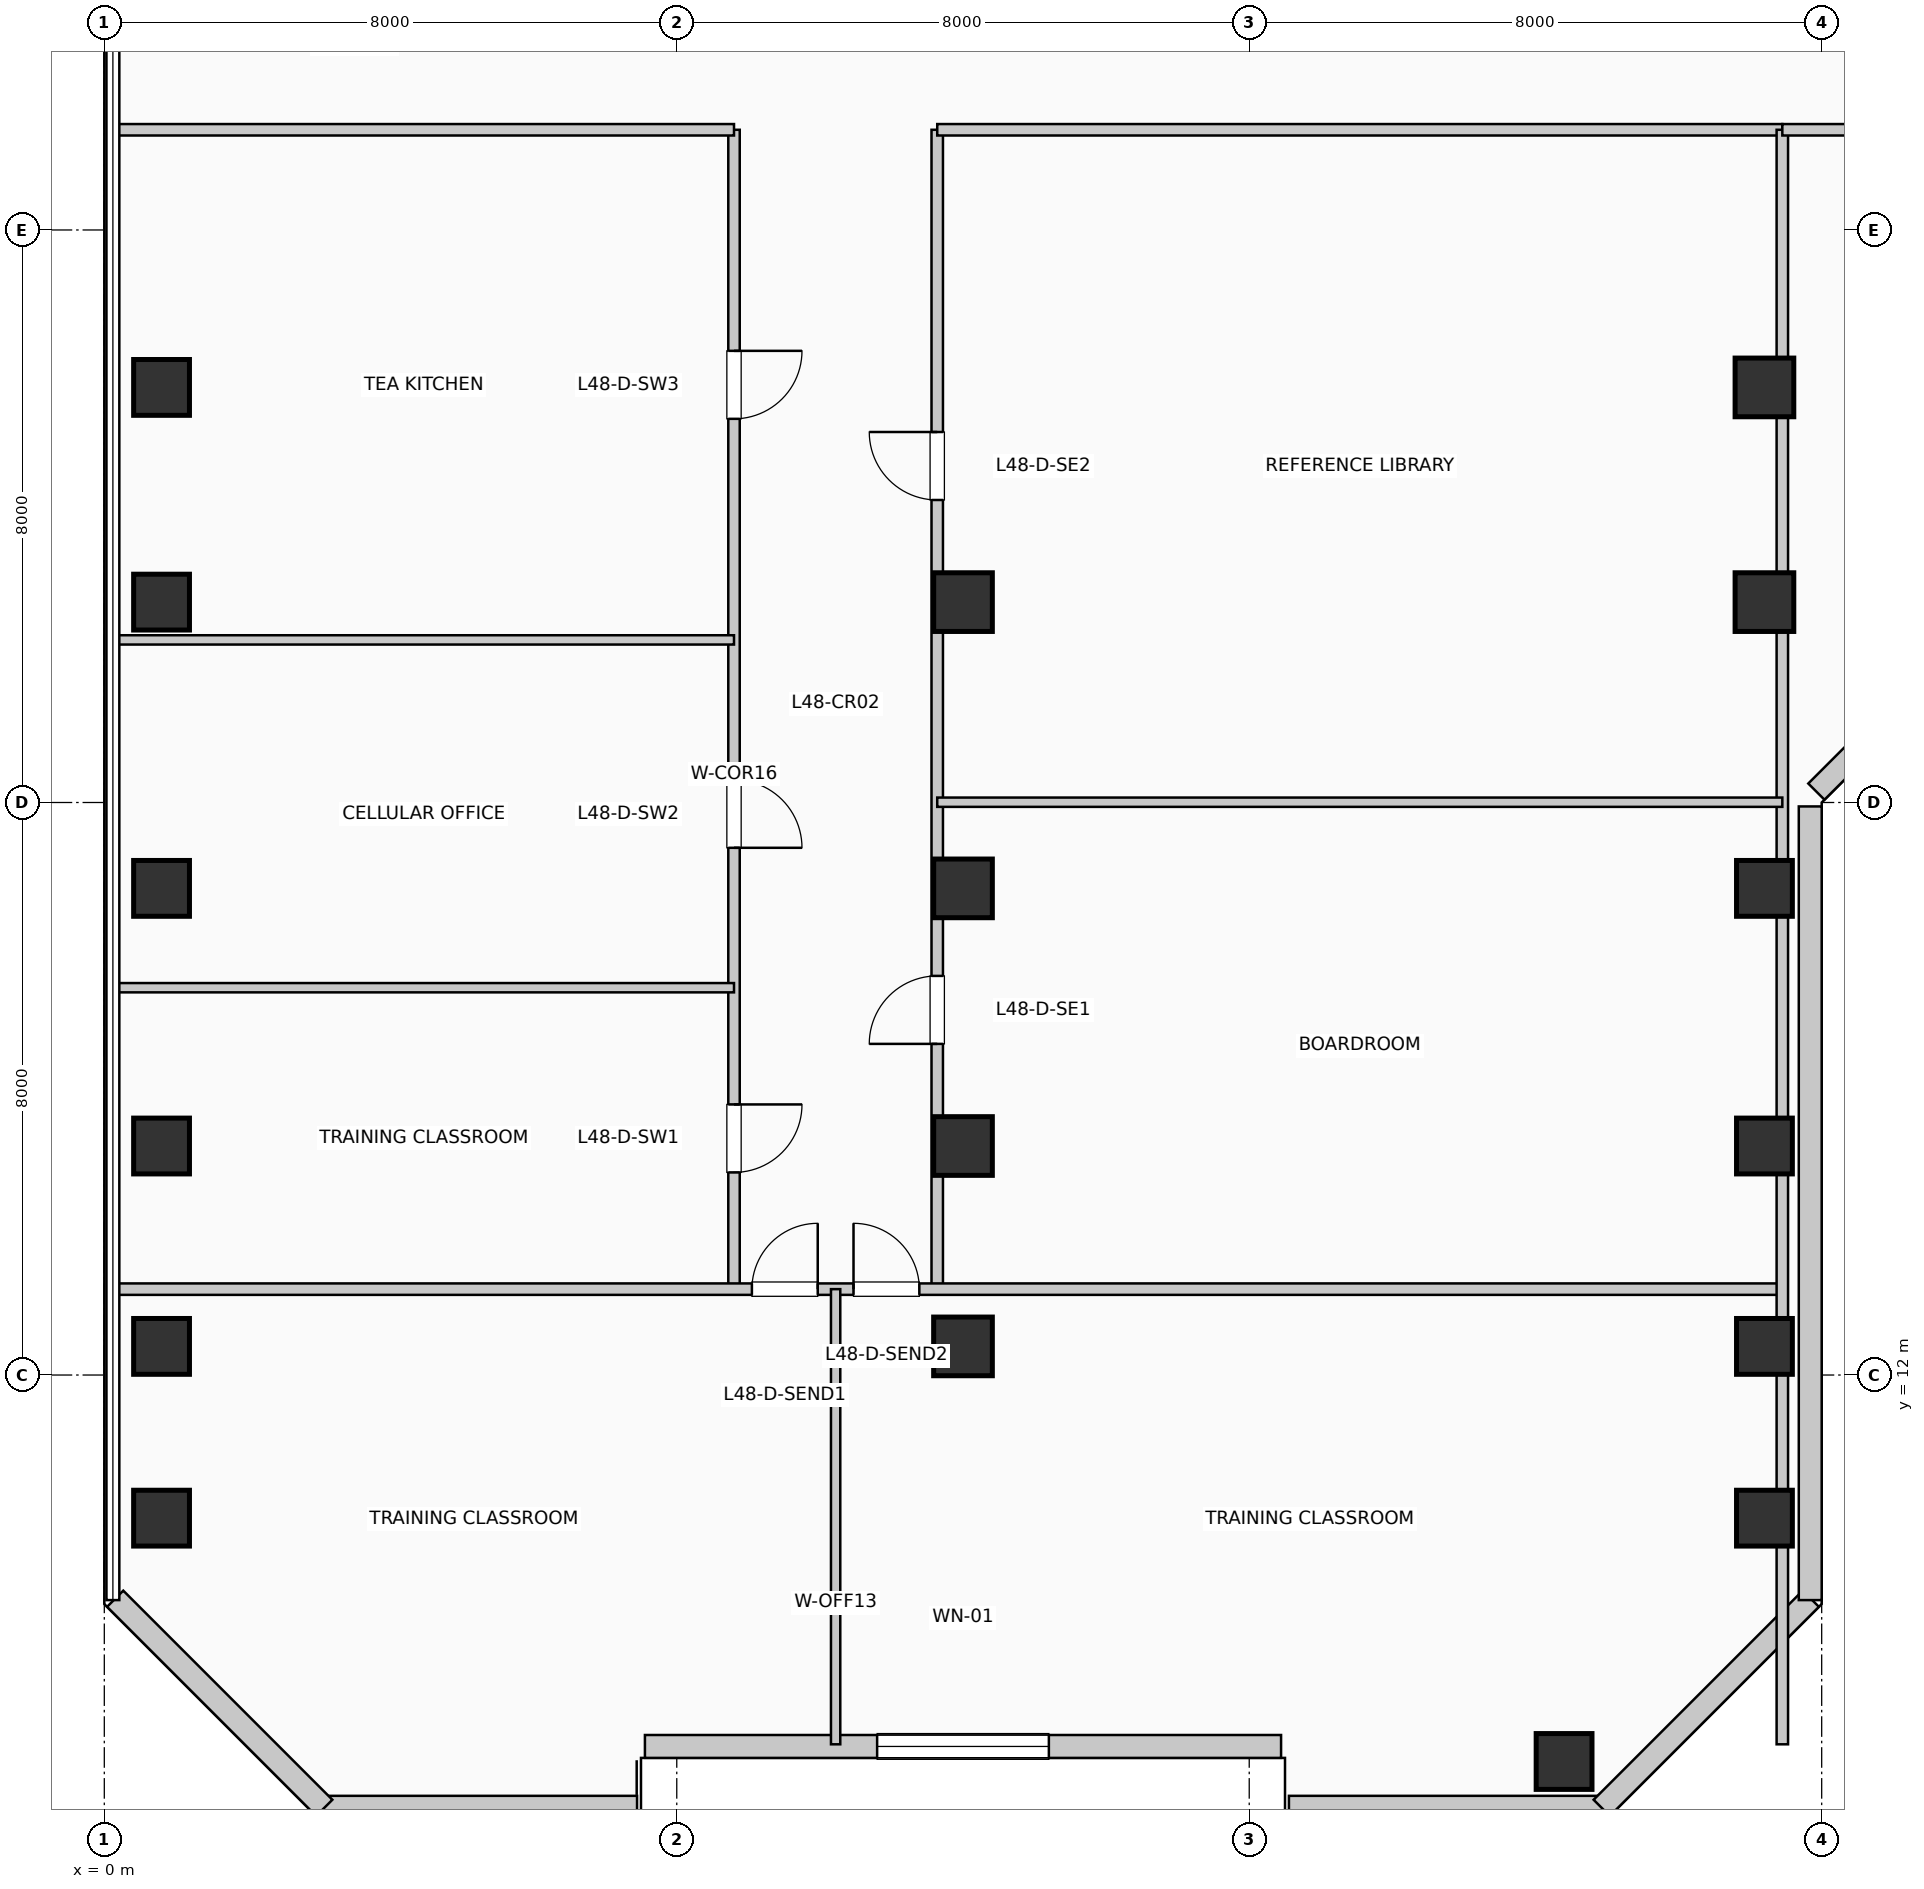
"""IFC4 building model, lengths in metres.
Left out: names, types, materials, properties, quantities, classifications, styles, units other than length and angle.
Written with IfcOpenShell. Run it as: python <this file> out.ifc"""

import sys

from ifc_helpers import new_model, si_unit, direction, frame, frame_2d, origin, origin_2d, place, context, subcontext, project, spatial, rectangle, extrude, element, fill, save


model = new_model("IFC4")
c1 = context("Model", 3, precision=1e-05, world=origin(), true_north=direction((0.0, 1.0)))
c2 = subcontext(c1, "Body", "Model", "MODEL_VIEW")
j1 = project(units=[si_unit("LENGTHUNIT", "METRE"), si_unit("PLANEANGLEUNIT", "RADIAN")], contexts=[c1])
p1 = place(None, origin())
s1 = spatial("IfcSite", under=j1, at=p1, CompositionType="ELEMENT")
p2 = place(p1, origin())
s2 = spatial("IfcBuilding", under=s1, at=p2, CompositionType="ELEMENT")
p3 = place(p2, frame((0.0, 0.0, 199.32)))
s3 = spatial("IfcBuildingStorey", under=s2, at=p3, CompositionType="ELEMENT", Elevation=199.32)
for number, where, z_axis, x_axis in (
    (1, (0.8, 10.0, 0.0), (0.0, 0.0, 1.0), (1.0, 0.0, 0.0)),
    (2, (0.8, 12.4, 0.0), (0.0, 0.0, 1.0), (1.0, 0.0, 0.0)),
    (3, (0.8, 15.2, 0.0), (0.0, 0.0, 1.0), (1.0, 0.0, 0.0)),
    (4, (0.8, 18.8, 0.0), (0.0, 0.0, 1.0), (1.0, 0.0, 0.0)),
    (5, (0.8, 22.8, 0.0), (0.0, 0.0, 1.0), (1.0, 0.0, 0.0)),
    (6, (0.8, 25.8, 0.0), (0.0, 0.0, 1.0), (1.0, 0.0, 0.0)),
):
    element("IfcColumn", number, at=place(p3, frame(where, z_axis=z_axis, x_axis=x_axis)), inside=s3, PredefinedType="COLUMN", context=c2, shape_type="SweptSolid", body=[
        extrude(rectangle(XDim=0.78, YDim=0.78, at=origin_2d()), origin(), (0.0, 0.0, 1.0), 3.96),
    ])
for number, where, z_axis, x_axis in (
    (7, (12.0, 12.4, 0.0), (0.0, 0.0, 1.0), (1.0, 0.0, 0.0)),
    (8, (12.0, 15.2, 0.0), (0.0, 0.0, 1.0), (1.0, 0.0, 0.0)),
    (9, (12.0, 18.8, 0.0), (0.0, 0.0, 1.0), (1.0, 0.0, 0.0)),
    (10, (12.0, 22.8, 0.0), (0.0, 0.0, 1.0), (1.0, 0.0, 0.0)),
):
    element("IfcColumn", number, at=place(p3, frame(where, z_axis=z_axis, x_axis=x_axis)), inside=s3, PredefinedType="COLUMN", context=c2, shape_type="SweptSolid", body=[
        extrude(rectangle(XDim=0.82, YDim=0.82, at=origin_2d()), origin(), (0.0, 0.0, 1.0), 3.96),
    ])
for number, where, z_axis, x_axis in (
    (11, (20.4, 6.6, 0.0), (0.0, 0.0, 1.0), (1.0, 0.0, 0.0)),
    (12, (23.2, 10.0, 0.0), (0.0, 0.0, 1.0), (1.0, 0.0, 0.0)),
    (13, (23.2, 12.4, 0.0), (0.0, 0.0, 1.0), (1.0, 0.0, 0.0)),
    (14, (23.2, 15.2, 0.0), (0.0, 0.0, 1.0), (1.0, 0.0, 0.0)),
    (15, (23.2, 18.8, 0.0), (0.0, 0.0, 1.0), (1.0, 0.0, 0.0)),
):
    element("IfcColumn", number, at=place(p3, frame(where, z_axis=z_axis, x_axis=x_axis)), inside=s3, PredefinedType="COLUMN", context=c2, shape_type="SweptSolid", body=[
        extrude(rectangle(XDim=0.78, YDim=0.78, at=origin_2d()), origin(), (0.0, 0.0, 1.0), 3.96),
    ])
for number, where, z_axis, x_axis in (
    (16, (23.2, 22.8, 0.0), (0.0, 0.0, 1.0), (1.0, 0.0, 0.0)),
    (17, (23.2, 25.8, 0.0), (0.0, 0.0, 1.0), (1.0, 0.0, 0.0)),
):
    element("IfcColumn", number, at=place(p3, frame(where, z_axis=z_axis, x_axis=x_axis)), inside=s3, PredefinedType="COLUMN", context=c2, shape_type="SweptSolid", body=[
        extrude(rectangle(XDim=0.82, YDim=0.82, at=origin_2d()), origin(), (0.0, 0.0, 1.0), 3.96),
    ])
p4 = place(p3, frame((3.055, 5.96, 0.0), z_axis=(0.0, 0.0, 1.0), x_axis=(1.0, 0.0, 0.0)))
e18 = element("IfcWall", 18, at=p4, inside=s3, PredefinedType="SOLIDWALL", context=c2, shape_type="SweptSolid", body=[
    extrude(rectangle(XDim=4.39, YDim=0.32, at=frame_2d((2.195, 0.0))), origin(), (0.0, 0.0, 1.0), 3.71),
])
p5 = place(p3, frame((7.555, 6.81, 0.0), z_axis=(0.0, 0.0, 1.0), x_axis=(1.0, 0.0, 0.0)))
e19 = element("IfcWall", 19, at=p5, inside=s3, PredefinedType="SOLIDWALL", context=c2, shape_type="SweptSolid", body=[
    extrude(rectangle(XDim=8.89, YDim=0.32, at=frame_2d((4.445, 0.0))), origin(), (0.0, 0.0, 1.0), 3.71),
])
p6 = place(p5, frame((3.245, 0.0, 0.85)))
e20 = element("IfcOpeningElement", 20, at=p6, cuts=e19, PredefinedType="OPENING", context=c2, shape_type="SweptSolid", body=[
    extrude(rectangle(XDim=2.4, YDim=2.05, at=frame_2d((1.2, 1.025))), frame((0.0, 0.17, 0.0), z_axis=(0.0, -1.0, 0.0), x_axis=(1.0, 0.0, 0.0)), (0.0, 0.0, 1.0), 0.34),
])
p7 = place(p3, frame((16.555, 5.96, 0.0), z_axis=(0.0, 0.0, 1.0), x_axis=(1.0, 0.0, 0.0)))
e21 = element("IfcWall", 21, at=p7, inside=s3, PredefinedType="SOLIDWALL", context=c2, shape_type="SweptSolid", body=[
    extrude(rectangle(XDim=4.39, YDim=0.32, at=frame_2d((2.195, 0.0))), origin(), (0.0, 0.0, 1.0), 3.71),
])
p8 = place(p3, frame((20.926, 5.952, 0.0), z_axis=(0.0, 0.0, 1.0), x_axis=(0.707077242712, 0.707136318428, 0.0)))
e22 = element("IfcWall", 22, at=p8, inside=s3, PredefinedType="SOLIDWALL", context=c2, shape_type="SweptSolid", body=[
    extrude(rectangle(XDim=4.133, YDim=0.32, at=frame_2d((2.066, 0.0))), origin(), (0.0, 0.0, 1.0), 3.71),
])
p9 = place(p3, frame((23.84, 8.855, 0.0), z_axis=(0.0, 0.0, 1.0), x_axis=(0.0, 1.0, 0.0)))
e23 = element("IfcWall", 23, at=p9, inside=s3, PredefinedType="SOLIDWALL", context=c2, shape_type="SweptSolid", body=[
    extrude(rectangle(XDim=11.09, YDim=0.32, at=frame_2d((5.545, 0.0))), origin(), (0.0, 0.0, 1.0), 3.71),
])
p10 = place(p3, frame((23.926, 20.152, 0.0), z_axis=(0.0, 0.0, 1.0), x_axis=(0.707106781187, 0.707106781187, 0.0)))
e24 = element("IfcWall", 24, at=p10, inside=s3, PredefinedType="SOLIDWALL", context=c2, shape_type="SweptSolid", body=[
    extrude(rectangle(XDim=2.718, YDim=0.32, at=frame_2d((1.359, 0.0))), origin(), (0.0, 0.0, 1.0), 3.71),
])
p11 = place(p3, frame((0.152, 8.874, 0.0), z_axis=(0.0, 0.0, 1.0), x_axis=(0.707077242712, -0.707136318428, 0.0)))
e25 = element("IfcWall", 25, at=p11, inside=s3, PredefinedType="SOLIDWALL", context=c2, shape_type="SweptSolid", body=[
    extrude(rectangle(XDim=4.133, YDim=0.32, at=frame_2d((2.066, 0.0))), origin(), (0.0, 0.0, 1.0), 3.71),
])
p12 = place(p3, frame((8.8, 13.2, 0.0), z_axis=(0.0, 0.0, 1.0), x_axis=(0.0, 1.0, 0.0)))
e26 = element("IfcWall", 26, at=p12, inside=s3, PredefinedType="PARTITIONING", context=c2, shape_type="SweptSolid", body=[
    extrude(rectangle(XDim=16.2, YDim=0.16, at=frame_2d((8.1, 0.0))), origin(), (0.0, 0.0, 1.0), 3.71),
])
p13 = place(p12, frame((2.581, 0.0, 0.0), z_axis=(0.0, 0.0, 1.0), x_axis=(-1.0, 0.0, 0.0)))
e27 = element("IfcOpeningElement", 27, at=p13, cuts=e26, PredefinedType="OPENING", context=c2, shape_type="SweptSolid", body=[
    extrude(rectangle(XDim=0.95, YDim=2.15, at=frame_2d((0.475, 1.075))), frame((0.0, 0.09, 0.0), z_axis=(0.0, -1.0, 0.0), x_axis=(1.0, 0.0, 0.0)), (0.0, 0.0, 1.0), 0.18),
])
p14 = place(p12, frame((7.117, 0.0, 0.0), z_axis=(0.0, 0.0, 1.0), x_axis=(-1.0, 0.0, 0.0)))
e28 = element("IfcOpeningElement", 28, at=p14, cuts=e26, PredefinedType="OPENING", context=c2, shape_type="SweptSolid", body=[
    extrude(rectangle(XDim=0.95, YDim=2.15, at=frame_2d((0.475, 1.075))), frame((0.0, 0.09, 0.0), z_axis=(0.0, -1.0, 0.0), x_axis=(1.0, 0.0, 0.0)), (0.0, 0.0, 1.0), 0.18),
])
p15 = place(p12, frame((13.111, 0.0, 0.0), z_axis=(0.0, 0.0, 1.0), x_axis=(-1.0, 0.0, 0.0)))
e29 = element("IfcOpeningElement", 29, at=p15, cuts=e26, PredefinedType="OPENING", context=c2, shape_type="SweptSolid", body=[
    extrude(rectangle(XDim=0.95, YDim=2.15, at=frame_2d((0.475, 1.075))), frame((0.0, 0.09, 0.0), z_axis=(0.0, -1.0, 0.0), x_axis=(1.0, 0.0, 0.0)), (0.0, 0.0, 1.0), 0.18),
])
p16 = place(p3, frame((11.64, 13.2, 0.0), z_axis=(0.0, 0.0, 1.0), x_axis=(0.0, 1.0, 0.0)))
e30 = element("IfcWall", 30, at=p16, inside=s3, PredefinedType="PARTITIONING", context=c2, shape_type="SweptSolid", body=[
    extrude(rectangle(XDim=16.2, YDim=0.16, at=frame_2d((8.1, 0.0))), origin(), (0.0, 0.0, 1.0), 3.095),
])
p17 = place(p16, frame((3.427, 0.0, 0.0)))
e31 = element("IfcOpeningElement", 31, at=p17, cuts=e30, PredefinedType="OPENING", context=c2, shape_type="SweptSolid", body=[
    extrude(rectangle(XDim=0.95, YDim=2.15, at=frame_2d((0.475, 1.075))), frame((0.0, 0.09, 0.0), z_axis=(0.0, -1.0, 0.0), x_axis=(1.0, 0.0, 0.0)), (0.0, 0.0, 1.0), 0.18),
])
p18 = place(p16, frame((11.027, 0.0, 0.0)))
e32 = element("IfcOpeningElement", 32, at=p18, cuts=e30, PredefinedType="OPENING", context=c2, shape_type="SweptSolid", body=[
    extrude(rectangle(XDim=0.95, YDim=2.15, at=frame_2d((0.475, 1.075))), frame((0.0, 0.09, 0.0), z_axis=(0.0, -1.0, 0.0), x_axis=(1.0, 0.0, 0.0)), (0.0, 0.0, 1.0), 0.18),
])
p19 = place(p3, frame((0.19, 13.2, 0.0), z_axis=(0.0, 0.0, 1.0), x_axis=(1.0, 0.0, 0.0)))
e33 = element("IfcWall", 33, at=p19, inside=s3, PredefinedType="PARTITIONING", context=c2, shape_type="SweptSolid", body=[
    extrude(rectangle(XDim=23.26, YDim=0.16, at=frame_2d((11.63, 0.0))), origin(), (0.0, 0.0, 1.0), 3.71),
])
p20 = place(p19, frame((8.86, 0.0, 0.0)))
e34 = element("IfcOpeningElement", 34, at=p20, cuts=e33, PredefinedType="OPENING", context=c2, shape_type="SweptSolid", body=[
    extrude(rectangle(XDim=0.92, YDim=2.1, at=frame_2d((0.46, 1.05))), frame((0.0, 0.09, 0.0), z_axis=(0.0, -1.0, 0.0), x_axis=(1.0, 0.0, 0.0)), (0.0, 0.0, 1.0), 0.18),
])
p21 = place(p19, frame((10.28, 0.0, 0.0)))
e35 = element("IfcOpeningElement", 35, at=p21, cuts=e33, PredefinedType="OPENING", context=c2, shape_type="SweptSolid", body=[
    extrude(rectangle(XDim=0.92, YDim=2.1, at=frame_2d((0.46, 1.05))), frame((0.0, 0.09, 0.0), z_axis=(0.0, -1.0, 0.0), x_axis=(1.0, 0.0, 0.0)), (0.0, 0.0, 1.0), 0.18),
])
p22 = place(p3, frame((0.19, 29.4, 0.0), z_axis=(0.0, 0.0, 1.0), x_axis=(1.0, 0.0, 0.0)))
e36 = element("IfcWall", 36, at=p22, inside=s3, PredefinedType="PARTITIONING", context=c2, shape_type="SweptSolid", body=[
    extrude(rectangle(XDim=8.61, YDim=0.16, at=frame_2d((4.305, 0.0))), origin(), (0.0, 0.0, 1.0), 3.365),
])
p23 = place(p3, frame((11.64, 29.4, 0.0), z_axis=(0.0, 0.0, 1.0), x_axis=(1.0, 0.0, 0.0)))
e37 = element("IfcWall", 37, at=p23, inside=s3, PredefinedType="PARTITIONING", context=c2, shape_type="SweptSolid", body=[
    extrude(rectangle(XDim=11.81, YDim=0.16, at=frame_2d((5.905, 0.0))), origin(), (0.0, 0.0, 1.0), 3.365),
])
p24 = place(p3, frame((23.45, 6.84, 0.0), z_axis=(0.0, 0.0, 1.0), x_axis=(0.0, 1.0, 0.0)))
e38 = element("IfcWall", 38, at=p24, inside=s3, PredefinedType="PARTITIONING", context=c2, shape_type="SweptSolid", body=[
    extrude(rectangle(XDim=22.56, YDim=0.16, at=frame_2d((11.28, 0.0))), origin(), (0.0, 0.0, 1.0), 3.095),
])
p25 = place(p3, frame((10.22, 6.84, 0.0), z_axis=(0.0, 0.0, 1.0), x_axis=(0.0, 1.0, 0.0)))
e39 = element("IfcWall", 39, at=p25, inside=s3, PredefinedType="PARTITIONING", context=c2, shape_type="SweptSolid", body=[
    extrude(rectangle(XDim=6.36, YDim=0.13, at=frame_2d((3.18, 0.0))), origin(), (0.0, 0.0, 1.0), 3.71),
])
for number, where, z_axis, x_axis in (
    (40, (0.19, 17.412, 0.0), (0.0, 0.0, 1.0), (1.0, 0.0, 0.0)),
    (41, (0.19, 22.272, 0.0), (0.0, 0.0, 1.0), (1.0, 0.0, 0.0)),
):
    element("IfcWall", number, at=place(p3, frame(where, z_axis=z_axis, x_axis=x_axis)), inside=s3, PredefinedType="PARTITIONING", context=c2, shape_type="SweptSolid", body=[
        extrude(rectangle(XDim=8.61, YDim=0.13, at=frame_2d((4.305, 0.0))), origin(), (0.0, 0.0, 1.0), 3.71),
    ])
p26 = place(p3, frame((11.64, 20.004, 0.0), z_axis=(0.0, 0.0, 1.0), x_axis=(1.0, 0.0, 0.0)))
e42 = element("IfcWall", 42, at=p26, inside=s3, PredefinedType="PARTITIONING", context=c2, shape_type="SweptSolid", body=[
    extrude(rectangle(XDim=11.81, YDim=0.13, at=frame_2d((5.905, 0.0))), origin(), (0.0, 0.0, 1.0), 3.71),
])
p27 = place(p3, frame((23.45, 29.4, 0.0), z_axis=(0.0, 0.0, 1.0), x_axis=(1.0, 0.0, 0.0)))
e43 = element("IfcWall", 43, at=p27, inside=s3, PredefinedType="PARTITIONING", context=c2, shape_type="SweptSolid", body=[
    extrude(rectangle(XDim=26.56, YDim=0.16, at=frame_2d((13.28, 0.0))), origin(), (0.0, 0.0, 1.0), 3.365),
])
p28 = place(p27, frame((5.787, 0.0, 0.0), z_axis=(0.0, 0.0, 1.0), x_axis=(-1.0, 0.0, 0.0)))
e44 = element("IfcOpeningElement", 44, at=p28, cuts=e43, PredefinedType="OPENING", context=c2, shape_type="SweptSolid", body=[
    extrude(rectangle(XDim=0.95, YDim=2.15, at=frame_2d((0.475, 1.075))), frame((0.0, 0.09, 0.0), z_axis=(0.0, -1.0, 0.0), x_axis=(1.0, 0.0, 0.0)), (0.0, 0.0, 1.0), 0.18),
])
p29 = place(p27, frame((19.067, 0.0, 0.0), z_axis=(0.0, 0.0, 1.0), x_axis=(-1.0, 0.0, 0.0)))
e45 = element("IfcOpeningElement", 45, at=p29, cuts=e43, PredefinedType="OPENING", context=c2, shape_type="SweptSolid", body=[
    extrude(rectangle(XDim=0.95, YDim=2.15, at=frame_2d((0.475, 1.075))), frame((0.0, 0.09, 0.0), z_axis=(0.0, -1.0, 0.0), x_axis=(1.0, 0.0, 0.0)), (0.0, 0.0, 1.0), 0.18),
])
p30 = place(p6, origin())
e46 = element("IfcWindow", 46, at=p30, inside=s3, PartitioningType="SINGLE_PANEL", PredefinedType="WINDOW", context=c2, shape_type="SweptSolid", body=[
    extrude(rectangle(XDim=2.4, YDim=2.05, at=frame_2d((1.2, 1.025))), frame((0.0, 0.03, 0.0), z_axis=(0.0, -1.0, 0.0), x_axis=(1.0, 0.0, 0.0)), (0.0, 0.0, 1.0), 0.06),
])
fill(e20, e46)
p31 = place(p20, origin())
e47 = element("IfcDoor", 47, at=p31, inside=s3, OperationType="SINGLE_SWING_RIGHT", PredefinedType="DOOR", context=c2, shape_type="SweptSolid", body=[
    extrude(rectangle(XDim=0.92, YDim=2.1, at=frame_2d((0.46, 1.05))), frame((0.0, 0.025, 0.0), z_axis=(0.0, -1.0, 0.0), x_axis=(1.0, 0.0, 0.0)), (0.0, 0.0, 1.0), 0.05),
])
fill(e34, e47)
p32 = place(p21, origin())
e48 = element("IfcDoor", 48, at=p32, inside=s3, OperationType="SINGLE_SWING_LEFT", PredefinedType="DOOR", context=c2, shape_type="SweptSolid", body=[
    extrude(rectangle(XDim=0.92, YDim=2.1, at=frame_2d((0.46, 1.05))), frame((0.0, 0.025, 0.0), z_axis=(0.0, -1.0, 0.0), x_axis=(1.0, 0.0, 0.0)), (0.0, 0.0, 1.0), 0.05),
])
fill(e35, e48)
p33 = place(p13, origin())
e49 = element("IfcDoor", 49, at=p33, inside=s3, OperationType="SINGLE_SWING_RIGHT", PredefinedType="DOOR", context=c2, shape_type="SweptSolid", body=[
    extrude(rectangle(XDim=0.95, YDim=2.15, at=frame_2d((0.475, 1.075))), frame((0.0, 0.025, 0.0), z_axis=(0.0, -1.0, 0.0), x_axis=(1.0, 0.0, 0.0)), (0.0, 0.0, 1.0), 0.05),
])
fill(e27, e49)
p34 = place(p14, origin())
e50 = element("IfcDoor", 50, at=p34, inside=s3, OperationType="SINGLE_SWING_LEFT", PredefinedType="DOOR", context=c2, shape_type="SweptSolid", body=[
    extrude(rectangle(XDim=0.95, YDim=2.15, at=frame_2d((0.475, 1.075))), frame((0.0, 0.025, 0.0), z_axis=(0.0, -1.0, 0.0), x_axis=(1.0, 0.0, 0.0)), (0.0, 0.0, 1.0), 0.05),
])
fill(e28, e50)
p35 = place(p15, origin())
e51 = element("IfcDoor", 51, at=p35, inside=s3, OperationType="SINGLE_SWING_RIGHT", PredefinedType="DOOR", context=c2, shape_type="SweptSolid", body=[
    extrude(rectangle(XDim=0.95, YDim=2.15, at=frame_2d((0.475, 1.075))), frame((0.0, 0.025, 0.0), z_axis=(0.0, -1.0, 0.0), x_axis=(1.0, 0.0, 0.0)), (0.0, 0.0, 1.0), 0.05),
])
fill(e29, e51)
p36 = place(p17, origin())
e52 = element("IfcDoor", 52, at=p36, inside=s3, OperationType="SINGLE_SWING_LEFT", PredefinedType="DOOR", context=c2, shape_type="SweptSolid", body=[
    extrude(rectangle(XDim=0.95, YDim=2.15, at=frame_2d((0.475, 1.075))), frame((0.0, 0.025, 0.0), z_axis=(0.0, -1.0, 0.0), x_axis=(1.0, 0.0, 0.0)), (0.0, 0.0, 1.0), 0.05),
])
fill(e31, e52)
p37 = place(p18, origin())
e53 = element("IfcDoor", 53, at=p37, inside=s3, OperationType="SINGLE_SWING_RIGHT", PredefinedType="DOOR", context=c2, shape_type="SweptSolid", body=[
    extrude(rectangle(XDim=0.95, YDim=2.15, at=frame_2d((0.475, 1.075))), frame((0.0, 0.025, 0.0), z_axis=(0.0, -1.0, 0.0), x_axis=(1.0, 0.0, 0.0)), (0.0, 0.0, 1.0), 0.05),
])
fill(e32, e53)
save(model, sys.argv[1])
